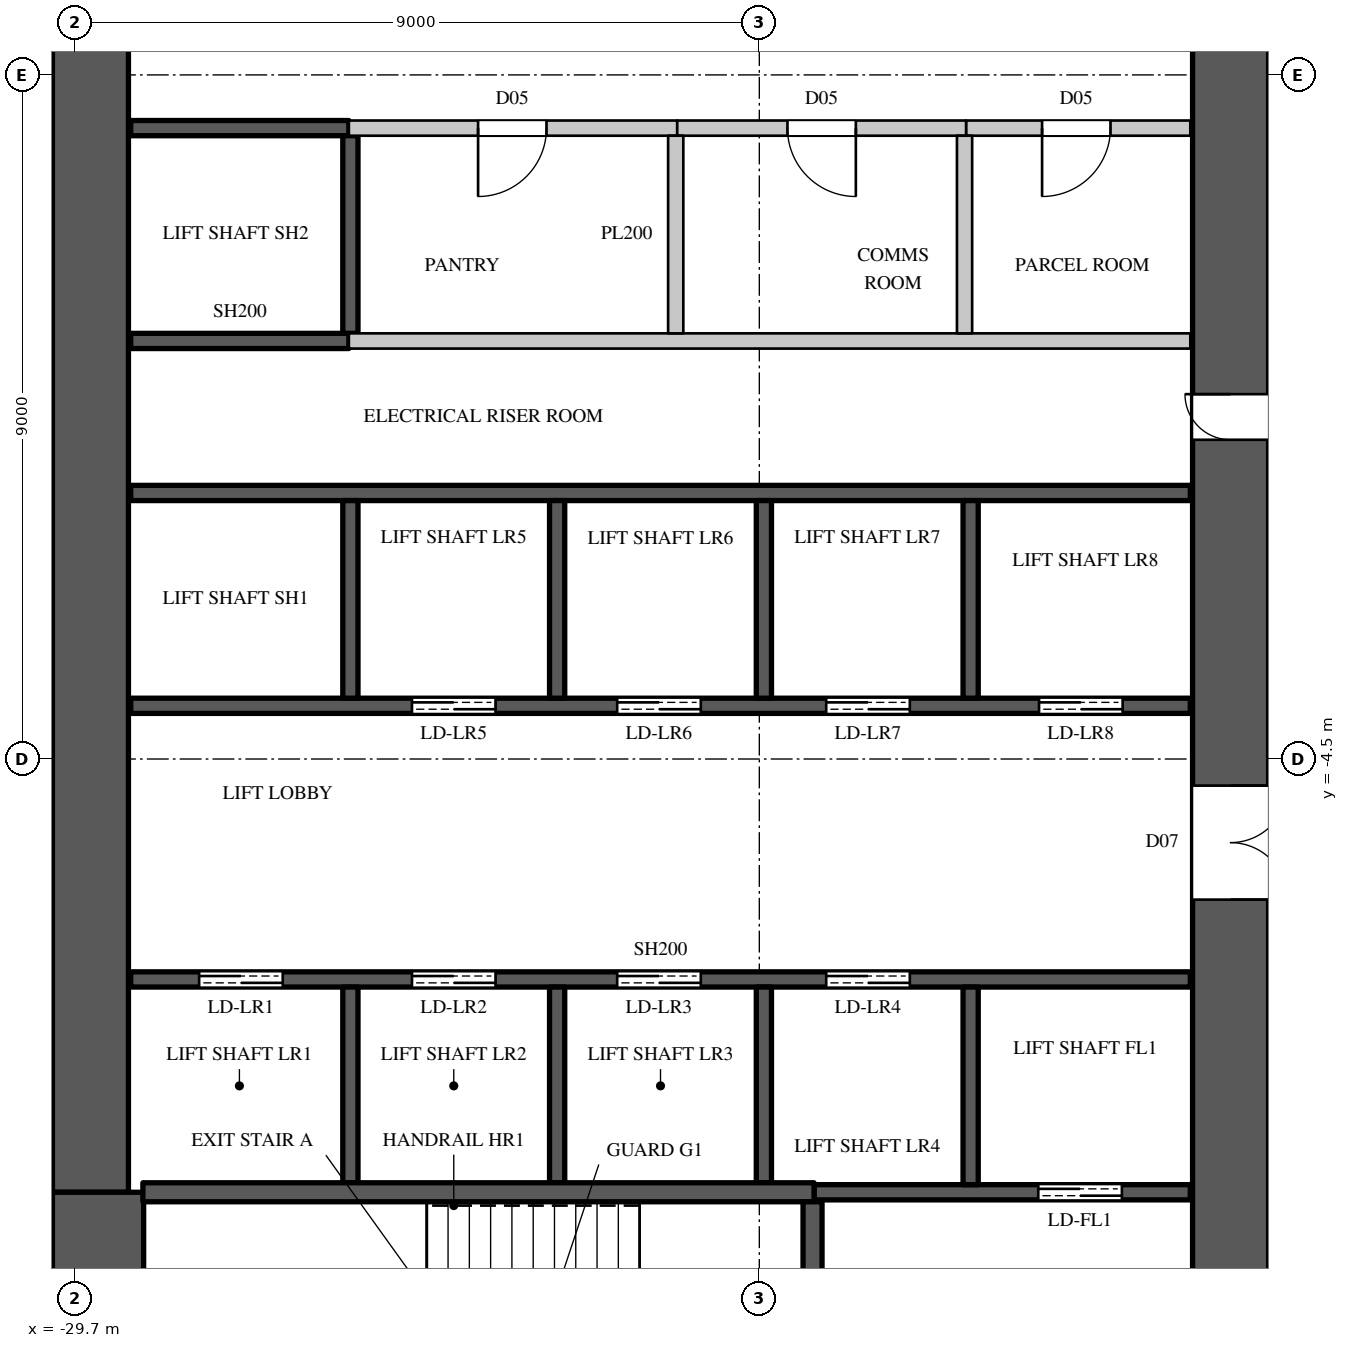
"""IFC4 building model, lengths in metres.
Left out: names, types, materials, properties, quantities, classifications, styles, units other than length and angle.
Written with IfcOpenShell. Run it as: python <this file> out.ifc"""

import sys

from ifc_helpers import new_model, si_unit, direction, frame, frame_2d, origin, place, context, subcontext, project, spatial, rectangle, extrude, element, fill, save


model = new_model("IFC4")
c1 = context("Model", 3, precision=1e-05, world=origin(), true_north=direction((0.0, 1.0)))
c2 = subcontext(c1, "Body", "Model", "MODEL_VIEW")
j1 = project(units=[si_unit("LENGTHUNIT", "METRE"), si_unit("PLANEANGLEUNIT", "RADIAN")], contexts=[c1])
p1 = place(None, origin())
s1 = spatial("IfcSite", under=j1, at=p1, CompositionType="ELEMENT")
p2 = place(p1, origin())
s2 = spatial("IfcBuilding", under=s1, at=p2, CompositionType="ELEMENT")
p3 = place(p2, frame((0.0, 0.0, 95.1)))
s3 = spatial("IfcBuildingStorey", under=s2, at=p3, CompositionType="ELEMENT", Elevation=95.1)
p4 = place(p3, frame((-14.5, -14.8, 0.0), z_axis=(0.0, 0.0, 1.0), x_axis=(0.0, 1.0, 0.0)))
e1 = element("IfcWall", 1, at=p4, inside=s3, PredefinedType="SHEAR", context=c2, shape_type="SweptSolid", body=[
    extrude(rectangle(XDim=29.6, YDim=1.0, at=frame_2d((14.8, 0.0))), origin(), (0.0, 0.0, 1.0), 3.6),
])
p5 = place(p4, frame((8.45, 0.0, 0.0)))
e2 = element("IfcOpeningElement", 2, at=p5, cuts=e1, PredefinedType="OPENING", context=c2, shape_type="SweptSolid", body=[
    extrude(rectangle(XDim=1.5, YDim=2.4, at=frame_2d((0.75, 1.2))), frame((0.0, 0.51, 0.0), z_axis=(0.0, -1.0, 0.0), x_axis=(1.0, 0.0, 0.0)), (0.0, 0.0, 1.0), 1.02),
])
p6 = place(p4, frame((19.65, 0.0, 0.0)))
e3 = element("IfcOpeningElement", 3, at=p6, cuts=e1, PredefinedType="OPENING", context=c2, shape_type="SweptSolid", body=[
    extrude(rectangle(XDim=1.5, YDim=2.4, at=frame_2d((0.75, 1.2))), frame((0.0, 0.51, 0.0), z_axis=(0.0, -1.0, 0.0), x_axis=(1.0, 0.0, 0.0)), (0.0, 0.0, 1.0), 1.02),
])
p7 = place(p4, frame((14.5, 0.0, 0.0)))
e4 = element("IfcOpeningElement", 4, at=p7, cuts=e1, PredefinedType="OPENING", context=c2, shape_type="SweptSolid", body=[
    extrude(rectangle(XDim=0.6, YDim=2.0, at=frame_2d((0.3, 1.0))), frame((0.0, 0.51, 0.0), z_axis=(0.0, -1.0, 0.0), x_axis=(1.0, 0.0, 0.0)), (0.0, 0.0, 1.0), 1.02),
])
p8 = place(p3, frame((-29.5, -10.2, 0.0), z_axis=(0.0, 0.0, 1.0), x_axis=(0.0, 1.0, 0.0)))
e5 = element("IfcWall", 5, at=p8, inside=s3, PredefinedType="SHEAR", context=c2, shape_type="SweptSolid", body=[
    extrude(rectangle(XDim=20.4, YDim=1.0, at=frame_2d((10.2, 0.0))), origin(), (0.0, 0.0, 1.0), 3.6),
])
p9 = place(p3, frame((-29.4, -14.8, 0.0), z_axis=(0.0, 0.0, 1.0), x_axis=(0.0, 1.0, 0.0)))
e6 = element("IfcWall", 6, at=p9, inside=s3, PredefinedType="SHEAR", context=c2, shape_type="SweptSolid", body=[
    extrude(rectangle(XDim=4.6, YDim=1.2, at=frame_2d((2.3, 0.0))), origin(), (0.0, 0.0, 1.0), 3.6),
])
p10 = place(p3, frame((-26.1, 3.8, 0.0), z_axis=(0.0, 0.0, 1.0), x_axis=(1.0, 0.0, 0.0)))
e7 = element("IfcWall", 7, at=p10, inside=s3, PredefinedType="PARTITIONING", context=c2, shape_type="SweptSolid", body=[
    extrude(rectangle(XDim=4.32, YDim=0.2, at=frame_2d((2.16, 0.0))), origin(), (0.0, 0.0, 1.0), 3.3),
])
p11 = place(p10, frame((1.7, 0.0, 0.0)))
e8 = element("IfcOpeningElement", 8, at=p11, cuts=e7, PredefinedType="OPENING", context=c2, shape_type="SweptSolid", body=[
    extrude(rectangle(XDim=0.9, YDim=2.2, at=frame_2d((0.45, 1.1))), frame((0.0, 0.11, 0.0), z_axis=(0.0, -1.0, 0.0), x_axis=(1.0, 0.0, 0.0)), (0.0, 0.0, 1.0), 0.22),
])
p12 = place(p3, frame((-17.98, 3.8, 0.0), z_axis=(0.0, 0.0, 1.0), x_axis=(1.0, 0.0, 0.0)))
e9 = element("IfcWall", 9, at=p12, inside=s3, PredefinedType="PARTITIONING", context=c2, shape_type="SweptSolid", body=[
    extrude(rectangle(XDim=2.95, YDim=0.2, at=frame_2d((1.475, 0.0))), origin(), (0.0, 0.0, 1.0), 3.3),
])
p13 = place(p12, frame((1.0, 0.0, 0.0)))
e10 = element("IfcOpeningElement", 10, at=p13, cuts=e9, PredefinedType="OPENING", context=c2, shape_type="SweptSolid", body=[
    extrude(rectangle(XDim=0.9, YDim=2.2, at=frame_2d((0.45, 1.1))), frame((0.0, 0.11, 0.0), z_axis=(0.0, -1.0, 0.0), x_axis=(1.0, 0.0, 0.0)), (0.0, 0.0, 1.0), 0.22),
])
p14 = place(p3, frame((-26.1, 1.0, 0.0), z_axis=(0.0, 0.0, 1.0), x_axis=(1.0, 0.0, 0.0)))
e11 = element("IfcWall", 11, at=p14, inside=s3, PredefinedType="PARTITIONING", context=c2, shape_type="SweptSolid", body=[
    extrude(rectangle(XDim=11.07, YDim=0.2, at=frame_2d((5.535, 0.0))), origin(), (0.0, 0.0, 1.0), 3.3),
])
p15 = place(p3, frame((-21.78, 3.8, 0.0), z_axis=(0.0, 0.0, 1.0), x_axis=(1.0, 0.0, 0.0)))
e12 = element("IfcWall", 12, at=p15, inside=s3, PredefinedType="PARTITIONING", context=c2, shape_type="SweptSolid", body=[
    extrude(rectangle(XDim=3.8, YDim=0.2, at=frame_2d((1.9, 0.0))), origin(), (0.0, 0.0, 1.0), 3.3),
])
p16 = place(p15, frame((1.45, 0.0, 0.0)))
e13 = element("IfcOpeningElement", 13, at=p16, cuts=e12, PredefinedType="OPENING", context=c2, shape_type="SweptSolid", body=[
    extrude(rectangle(XDim=0.9, YDim=2.2, at=frame_2d((0.45, 1.1))), frame((0.0, 0.11, 0.0), z_axis=(0.0, -1.0, 0.0), x_axis=(1.0, 0.0, 0.0)), (0.0, 0.0, 1.0), 0.22),
])
for number, where, z_axis, x_axis in (
    (14, (-21.8, 1.1, 0.0), (0.0, 0.0, 1.0), (0.0, 1.0, 0.0)),
    (15, (-18.0, 1.1, 0.0), (0.0, 0.0, 1.0), (0.0, 1.0, 0.0)),
):
    element("IfcWall", number, at=place(p3, frame(where, z_axis=z_axis, x_axis=x_axis)), inside=s3, PredefinedType="PARTITIONING", context=c2, shape_type="SweptSolid", body=[
        extrude(rectangle(XDim=2.6, YDim=0.2, at=frame_2d((1.3, 0.0))), origin(), (0.0, 0.0, 1.0), 3.3),
    ])
p17 = place(p3, frame((-28.97, -7.4, 0.0), z_axis=(0.0, 0.0, 1.0), x_axis=(1.0, 0.0, 0.0)))
e16 = element("IfcWall", 16, at=p17, inside=s3, PredefinedType="SHEAR", context=c2, shape_type="SweptSolid", body=[
    extrude(rectangle(XDim=13.94, YDim=0.2, at=frame_2d((6.97, 0.0))), origin(), (0.0, 0.0, 1.0), 3.3),
])
p18 = place(p17, frame((0.9, 0.0, 0.0)))
e17 = element("IfcOpeningElement", 17, at=p18, cuts=e16, PredefinedType="OPENING", context=c2, shape_type="SweptSolid", body=[
    extrude(rectangle(XDim=1.1, YDim=2.2, at=frame_2d((0.55, 1.1))), frame((0.0, 0.11, 0.0), z_axis=(0.0, -1.0, 0.0), x_axis=(1.0, 0.0, 0.0)), (0.0, 0.0, 1.0), 0.22),
])
p19 = place(p17, frame((3.7, 0.0, 0.0)))
e18 = element("IfcOpeningElement", 18, at=p19, cuts=e16, PredefinedType="OPENING", context=c2, shape_type="SweptSolid", body=[
    extrude(rectangle(XDim=1.1, YDim=2.2, at=frame_2d((0.55, 1.1))), frame((0.0, 0.11, 0.0), z_axis=(0.0, -1.0, 0.0), x_axis=(1.0, 0.0, 0.0)), (0.0, 0.0, 1.0), 0.22),
])
p20 = place(p17, frame((6.4, 0.0, 0.0)))
e19 = element("IfcOpeningElement", 19, at=p20, cuts=e16, PredefinedType="OPENING", context=c2, shape_type="SweptSolid", body=[
    extrude(rectangle(XDim=1.1, YDim=2.2, at=frame_2d((0.55, 1.1))), frame((0.0, 0.11, 0.0), z_axis=(0.0, -1.0, 0.0), x_axis=(1.0, 0.0, 0.0)), (0.0, 0.0, 1.0), 0.22),
])
p21 = place(p17, frame((9.15, 0.0, 0.0)))
e20 = element("IfcOpeningElement", 20, at=p21, cuts=e16, PredefinedType="OPENING", context=c2, shape_type="SweptSolid", body=[
    extrude(rectangle(XDim=1.1, YDim=2.2, at=frame_2d((0.55, 1.1))), frame((0.0, 0.11, 0.0), z_axis=(0.0, -1.0, 0.0), x_axis=(1.0, 0.0, 0.0)), (0.0, 0.0, 1.0), 0.22),
])
p22 = place(p3, frame((-28.97, -3.8, 0.0), z_axis=(0.0, 0.0, 1.0), x_axis=(1.0, 0.0, 0.0)))
e21 = element("IfcWall", 21, at=p22, inside=s3, PredefinedType="SHEAR", context=c2, shape_type="SweptSolid", body=[
    extrude(rectangle(XDim=13.94, YDim=0.2, at=frame_2d((6.97, 0.0))), origin(), (0.0, 0.0, 1.0), 3.3),
])
p23 = place(p22, frame((3.7, 0.0, 0.0)))
e22 = element("IfcOpeningElement", 22, at=p23, cuts=e21, PredefinedType="OPENING", context=c2, shape_type="SweptSolid", body=[
    extrude(rectangle(XDim=1.1, YDim=2.2, at=frame_2d((0.55, 1.1))), frame((0.0, 0.11, 0.0), z_axis=(0.0, -1.0, 0.0), x_axis=(1.0, 0.0, 0.0)), (0.0, 0.0, 1.0), 0.22),
])
p24 = place(p22, frame((6.4, 0.0, 0.0)))
e23 = element("IfcOpeningElement", 23, at=p24, cuts=e21, PredefinedType="OPENING", context=c2, shape_type="SweptSolid", body=[
    extrude(rectangle(XDim=1.1, YDim=2.2, at=frame_2d((0.55, 1.1))), frame((0.0, 0.11, 0.0), z_axis=(0.0, -1.0, 0.0), x_axis=(1.0, 0.0, 0.0)), (0.0, 0.0, 1.0), 0.22),
])
p25 = place(p22, frame((9.15, 0.0, 0.0)))
e24 = element("IfcOpeningElement", 24, at=p25, cuts=e21, PredefinedType="OPENING", context=c2, shape_type="SweptSolid", body=[
    extrude(rectangle(XDim=1.1, YDim=2.2, at=frame_2d((0.55, 1.1))), frame((0.0, 0.11, 0.0), z_axis=(0.0, -1.0, 0.0), x_axis=(1.0, 0.0, 0.0)), (0.0, 0.0, 1.0), 0.22),
])
p26 = place(p22, frame((11.95, 0.0, 0.0)))
e25 = element("IfcOpeningElement", 25, at=p26, cuts=e21, PredefinedType="OPENING", context=c2, shape_type="SweptSolid", body=[
    extrude(rectangle(XDim=1.1, YDim=2.2, at=frame_2d((0.55, 1.1))), frame((0.0, 0.11, 0.0), z_axis=(0.0, -1.0, 0.0), x_axis=(1.0, 0.0, 0.0)), (0.0, 0.0, 1.0), 0.22),
])
p27 = place(p3, frame((-28.97, -1.0, 0.0), z_axis=(0.0, 0.0, 1.0), x_axis=(1.0, 0.0, 0.0)))
e26 = element("IfcWall", 26, at=p27, inside=s3, PredefinedType="SHEAR", context=c2, shape_type="SweptSolid", body=[
    extrude(rectangle(XDim=13.94, YDim=0.2, at=frame_2d((6.97, 0.0))), origin(), (0.0, 0.0, 1.0), 3.3),
])
for number, where, z_axis, x_axis in (
    (27, (-28.97, 1.0, 0.0), (0.0, 0.0, 1.0), (1.0, 0.0, 0.0)),
    (28, (-28.97, 3.8, 0.0), (0.0, 0.0, 1.0), (1.0, 0.0, 0.0)),
):
    element("IfcWall", number, at=place(p3, frame(where, z_axis=z_axis, x_axis=x_axis)), inside=s3, PredefinedType="SHEAR", context=c2, shape_type="SweptSolid", body=[
        extrude(rectangle(XDim=2.87, YDim=0.2, at=frame_2d((1.435, 0.0))), origin(), (0.0, 0.0, 1.0), 3.3),
    ])
p28 = place(p3, frame((-26.08, -10.075, 0.0), z_axis=(0.0, 0.0, 1.0), x_axis=(0.0, 1.0, 0.0)))
e29 = element("IfcWall", 29, at=p28, inside=s3, PredefinedType="SHEAR", context=c2, shape_type="SweptSolid", body=[
    extrude(rectangle(XDim=2.575, YDim=0.2, at=frame_2d((1.288, 0.0))), origin(), (0.0, 0.0, 1.0), 3.6),
])
p29 = place(p3, frame((-26.08, -3.7, 0.0), z_axis=(0.0, 0.0, 1.0), x_axis=(0.0, 1.0, 0.0)))
e30 = element("IfcWall", 30, at=p29, inside=s3, PredefinedType="SHEAR", context=c2, shape_type="SweptSolid", body=[
    extrude(rectangle(XDim=2.6, YDim=0.2, at=frame_2d((1.3, 0.0))), origin(), (0.0, 0.0, 1.0), 3.6),
])
p30 = place(p3, frame((-26.08, 1.1, 0.0), z_axis=(0.0, 0.0, 1.0), x_axis=(0.0, 1.0, 0.0)))
e31 = element("IfcWall", 31, at=p30, inside=s3, PredefinedType="SHEAR", context=c2, shape_type="SweptSolid", body=[
    extrude(rectangle(XDim=2.6, YDim=0.2, at=frame_2d((1.3, 0.0))), origin(), (0.0, 0.0, 1.0), 3.3),
])
p31 = place(p3, frame((-23.36, -10.075, 0.0), z_axis=(0.0, 0.0, 1.0), x_axis=(0.0, 1.0, 0.0)))
e32 = element("IfcWall", 32, at=p31, inside=s3, PredefinedType="SHEAR", context=c2, shape_type="SweptSolid", body=[
    extrude(rectangle(XDim=2.575, YDim=0.2, at=frame_2d((1.288, 0.0))), origin(), (0.0, 0.0, 1.0), 3.6),
])
p32 = place(p3, frame((-23.36, -3.7, 0.0), z_axis=(0.0, 0.0, 1.0), x_axis=(0.0, 1.0, 0.0)))
e33 = element("IfcWall", 33, at=p32, inside=s3, PredefinedType="SHEAR", context=c2, shape_type="SweptSolid", body=[
    extrude(rectangle(XDim=2.6, YDim=0.2, at=frame_2d((1.3, 0.0))), origin(), (0.0, 0.0, 1.0), 3.6),
])
p33 = place(p3, frame((-20.64, -10.075, 0.0), z_axis=(0.0, 0.0, 1.0), x_axis=(0.0, 1.0, 0.0)))
e34 = element("IfcWall", 34, at=p33, inside=s3, PredefinedType="SHEAR", context=c2, shape_type="SweptSolid", body=[
    extrude(rectangle(XDim=2.575, YDim=0.2, at=frame_2d((1.288, 0.0))), origin(), (0.0, 0.0, 1.0), 3.6),
])
p34 = place(p3, frame((-20.64, -3.7, 0.0), z_axis=(0.0, 0.0, 1.0), x_axis=(0.0, 1.0, 0.0)))
e35 = element("IfcWall", 35, at=p34, inside=s3, PredefinedType="SHEAR", context=c2, shape_type="SweptSolid", body=[
    extrude(rectangle(XDim=2.6, YDim=0.2, at=frame_2d((1.3, 0.0))), origin(), (0.0, 0.0, 1.0), 3.6),
])
p35 = place(p3, frame((-19.98, -10.2, 0.0), z_axis=(0.0, 0.0, 1.0), x_axis=(1.0, 0.0, 0.0)))
e36 = element("IfcWall", 36, at=p35, inside=s3, PredefinedType="SHEAR", context=c2, shape_type="SweptSolid", body=[
    extrude(rectangle(XDim=4.95, YDim=0.2, at=frame_2d((2.475, 0.0))), origin(), (0.0, 0.0, 1.0), 3.3),
])
p36 = place(p35, frame((2.95, 0.0, 0.0)))
e37 = element("IfcOpeningElement", 37, at=p36, cuts=e36, PredefinedType="OPENING", context=c2, shape_type="SweptSolid", body=[
    extrude(rectangle(XDim=1.1, YDim=2.2, at=frame_2d((0.55, 1.1))), frame((0.0, 0.11, 0.0), z_axis=(0.0, -1.0, 0.0), x_axis=(1.0, 0.0, 0.0)), (0.0, 0.0, 1.0), 0.22),
])
p37 = place(p3, frame((-17.92, -10.1, 0.0), z_axis=(0.0, 0.0, 1.0), x_axis=(0.0, 1.0, 0.0)))
e38 = element("IfcWall", 38, at=p37, inside=s3, PredefinedType="SHEAR", context=c2, shape_type="SweptSolid", body=[
    extrude(rectangle(XDim=2.6, YDim=0.2, at=frame_2d((1.3, 0.0))), origin(), (0.0, 0.0, 1.0), 3.6),
])
p38 = place(p3, frame((-17.92, -3.7, 0.0), z_axis=(0.0, 0.0, 1.0), x_axis=(0.0, 1.0, 0.0)))
e39 = element("IfcWall", 39, at=p38, inside=s3, PredefinedType="SHEAR", context=c2, shape_type="SweptSolid", body=[
    extrude(rectangle(XDim=2.6, YDim=0.2, at=frame_2d((1.3, 0.0))), origin(), (0.0, 0.0, 1.0), 3.6),
])
p39 = place(p3, frame((-28.81, -10.2, 0.0), z_axis=(0.0, 0.0, 1.0), x_axis=(1.0, 0.0, 0.0)))
e40 = element("IfcWall", 40, at=p39, inside=s3, PredefinedType="SHEAR", context=c2, shape_type="SweptSolid", body=[
    extrude(rectangle(XDim=8.83, YDim=0.25, at=frame_2d((4.415, 0.0))), origin(), (0.0, 0.0, 1.0), 3.3),
])
p40 = place(p3, frame((-20.0, -14.77, 0.0), z_axis=(0.0, 0.0, 1.0), x_axis=(0.0, 1.0, 0.0)))
e41 = element("IfcWall", 41, at=p40, inside=s3, PredefinedType="SHEAR", context=c2, shape_type="SweptSolid", body=[
    extrude(rectangle(XDim=4.445, YDim=0.25, at=frame_2d((2.223, 0.0))), origin(), (0.0, 0.0, 1.0), 3.3),
])
p41 = place(p40, frame((1.7, 0.0, 0.0)))
e42 = element("IfcOpeningElement", 42, at=p41, cuts=e41, PredefinedType="OPENING", context=c2, shape_type="SweptSolid", body=[
    extrude(rectangle(XDim=1.1, YDim=2.2, at=frame_2d((0.55, 1.1))), frame((0.0, 0.135, 0.0), z_axis=(0.0, -1.0, 0.0), x_axis=(1.0, 0.0, 0.0)), (0.0, 0.0, 1.0), 0.27),
])
p42 = place(p11, origin())
e43 = element("IfcDoor", 43, at=p42, inside=s3, OperationType="SINGLE_SWING_RIGHT", PredefinedType="DOOR", context=c2, shape_type="SweptSolid", body=[
    extrude(rectangle(XDim=0.9, YDim=2.2, at=frame_2d((0.45, 1.1))), frame((0.0, 0.025, 0.0), z_axis=(0.0, -1.0, 0.0), x_axis=(1.0, 0.0, 0.0)), (0.0, 0.0, 1.0), 0.05),
])
fill(e8, e43)
p43 = place(p16, origin())
e44 = element("IfcDoor", 44, at=p43, inside=s3, OperationType="SINGLE_SWING_LEFT", PredefinedType="DOOR", context=c2, shape_type="SweptSolid", body=[
    extrude(rectangle(XDim=0.9, YDim=2.2, at=frame_2d((0.45, 1.1))), frame((0.0, 0.025, 0.0), z_axis=(0.0, -1.0, 0.0), x_axis=(1.0, 0.0, 0.0)), (0.0, 0.0, 1.0), 0.05),
])
fill(e13, e44)
p44 = place(p13, origin())
e45 = element("IfcDoor", 45, at=p44, inside=s3, OperationType="SINGLE_SWING_RIGHT", PredefinedType="DOOR", context=c2, shape_type="SweptSolid", body=[
    extrude(rectangle(XDim=0.9, YDim=2.2, at=frame_2d((0.45, 1.1))), frame((0.0, 0.025, 0.0), z_axis=(0.0, -1.0, 0.0), x_axis=(1.0, 0.0, 0.0)), (0.0, 0.0, 1.0), 0.05),
])
fill(e10, e45)
p45 = place(p18, origin())
e46 = element("IfcDoor", 46, at=p45, inside=s3, OperationType="DOUBLE_DOOR_SLIDING", PredefinedType="DOOR", context=c2, shape_type="SweptSolid", body=[
    extrude(rectangle(XDim=1.1, YDim=2.2, at=frame_2d((0.55, 1.1))), frame((0.0, 0.025, 0.0), z_axis=(0.0, -1.0, 0.0), x_axis=(1.0, 0.0, 0.0)), (0.0, 0.0, 1.0), 0.05),
])
fill(e17, e46)
p46 = place(p19, origin())
e47 = element("IfcDoor", 47, at=p46, inside=s3, OperationType="DOUBLE_DOOR_SLIDING", PredefinedType="DOOR", context=c2, shape_type="SweptSolid", body=[
    extrude(rectangle(XDim=1.1, YDim=2.2, at=frame_2d((0.55, 1.1))), frame((0.0, 0.025, 0.0), z_axis=(0.0, -1.0, 0.0), x_axis=(1.0, 0.0, 0.0)), (0.0, 0.0, 1.0), 0.05),
])
fill(e18, e47)
p47 = place(p20, origin())
e48 = element("IfcDoor", 48, at=p47, inside=s3, OperationType="DOUBLE_DOOR_SLIDING", PredefinedType="DOOR", context=c2, shape_type="SweptSolid", body=[
    extrude(rectangle(XDim=1.1, YDim=2.2, at=frame_2d((0.55, 1.1))), frame((0.0, 0.025, 0.0), z_axis=(0.0, -1.0, 0.0), x_axis=(1.0, 0.0, 0.0)), (0.0, 0.0, 1.0), 0.05),
])
fill(e19, e48)
p48 = place(p21, origin())
e49 = element("IfcDoor", 49, at=p48, inside=s3, OperationType="DOUBLE_DOOR_SLIDING", PredefinedType="DOOR", context=c2, shape_type="SweptSolid", body=[
    extrude(rectangle(XDim=1.1, YDim=2.2, at=frame_2d((0.55, 1.1))), frame((0.0, 0.025, 0.0), z_axis=(0.0, -1.0, 0.0), x_axis=(1.0, 0.0, 0.0)), (0.0, 0.0, 1.0), 0.05),
])
fill(e20, e49)
p49 = place(p36, origin())
e50 = element("IfcDoor", 50, at=p49, inside=s3, OperationType="DOUBLE_DOOR_SLIDING", PredefinedType="DOOR", context=c2, shape_type="SweptSolid", body=[
    extrude(rectangle(XDim=1.1, YDim=2.2, at=frame_2d((0.55, 1.1))), frame((0.0, 0.025, 0.0), z_axis=(0.0, -1.0, 0.0), x_axis=(1.0, 0.0, 0.0)), (0.0, 0.0, 1.0), 0.05),
])
fill(e37, e50)
p50 = place(p23, origin())
e51 = element("IfcDoor", 51, at=p50, inside=s3, OperationType="DOUBLE_DOOR_SLIDING", PredefinedType="DOOR", context=c2, shape_type="SweptSolid", body=[
    extrude(rectangle(XDim=1.1, YDim=2.2, at=frame_2d((0.55, 1.1))), frame((0.0, 0.025, 0.0), z_axis=(0.0, -1.0, 0.0), x_axis=(1.0, 0.0, 0.0)), (0.0, 0.0, 1.0), 0.05),
])
fill(e22, e51)
p51 = place(p24, origin())
e52 = element("IfcDoor", 52, at=p51, inside=s3, OperationType="DOUBLE_DOOR_SLIDING", PredefinedType="DOOR", context=c2, shape_type="SweptSolid", body=[
    extrude(rectangle(XDim=1.1, YDim=2.2, at=frame_2d((0.55, 1.1))), frame((0.0, 0.025, 0.0), z_axis=(0.0, -1.0, 0.0), x_axis=(1.0, 0.0, 0.0)), (0.0, 0.0, 1.0), 0.05),
])
fill(e23, e52)
p52 = place(p25, origin())
e53 = element("IfcDoor", 53, at=p52, inside=s3, OperationType="DOUBLE_DOOR_SLIDING", PredefinedType="DOOR", context=c2, shape_type="SweptSolid", body=[
    extrude(rectangle(XDim=1.1, YDim=2.2, at=frame_2d((0.55, 1.1))), frame((0.0, 0.025, 0.0), z_axis=(0.0, -1.0, 0.0), x_axis=(1.0, 0.0, 0.0)), (0.0, 0.0, 1.0), 0.05),
])
fill(e24, e53)
p53 = place(p26, origin())
e54 = element("IfcDoor", 54, at=p53, inside=s3, OperationType="DOUBLE_DOOR_SLIDING", PredefinedType="DOOR", context=c2, shape_type="SweptSolid", body=[
    extrude(rectangle(XDim=1.1, YDim=2.2, at=frame_2d((0.55, 1.1))), frame((0.0, 0.025, 0.0), z_axis=(0.0, -1.0, 0.0), x_axis=(1.0, 0.0, 0.0)), (0.0, 0.0, 1.0), 0.05),
])
fill(e25, e54)
p54 = place(p5, origin())
e55 = element("IfcDoor", 55, at=p54, inside=s3, OperationType="DOUBLE_DOOR_SINGLE_SWING", PredefinedType="DOOR", context=c2, shape_type="SweptSolid", body=[
    extrude(rectangle(XDim=1.5, YDim=2.4, at=frame_2d((0.75, 1.2))), frame((0.0, -0.445, 0.0), z_axis=(0.0, -1.0, 0.0), x_axis=(1.0, 0.0, 0.0)), (0.0, 0.0, 1.0), 0.05),
])
fill(e2, e55)
p55 = place(p7, origin())
e56 = element("IfcDoor", 56, at=p55, inside=s3, OperationType="SINGLE_SWING_RIGHT", PredefinedType="DOOR", context=c2, shape_type="SweptSolid", body=[
    extrude(rectangle(XDim=0.6, YDim=2.0, at=frame_2d((0.3, 1.0))), frame((0.0, 0.495, 0.0), z_axis=(0.0, -1.0, 0.0), x_axis=(1.0, 0.0, 0.0)), (0.0, 0.0, 1.0), 0.05),
])
fill(e4, e56)
save(model, sys.argv[1])
